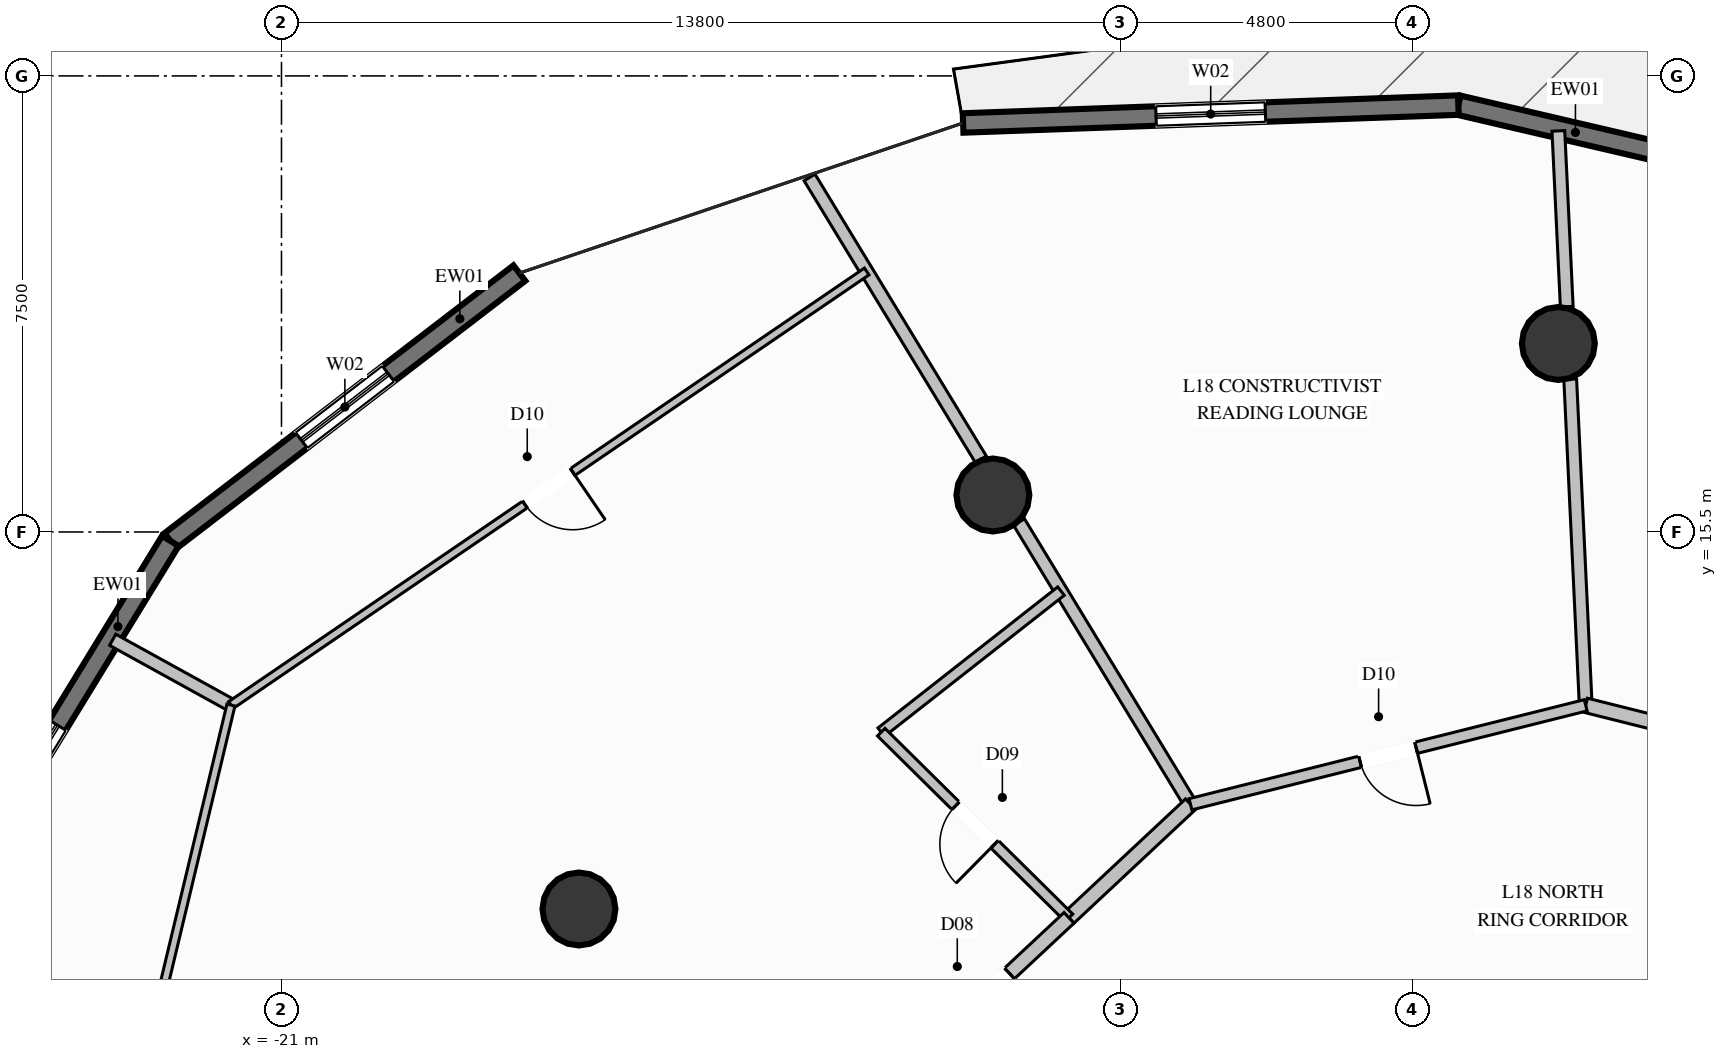
"""IFC4 building model, lengths in metres.
Left out: names, types, materials, properties, quantities, classifications, styles, units other than length and angle.
Written with IfcOpenShell. Run it as: python <this file> out.ifc"""

import sys

from ifc_helpers import new_model, si_unit, direction, frame, frame_2d, origin, origin_2d, place, context, subcontext, project, spatial, rectangle, circle, extrude, element, fill, save


model = new_model("IFC4")
c1 = context("Model", 3, precision=1e-05, world=origin(), true_north=direction((0.0, 1.0)))
c2 = subcontext(c1, "Body", "Model", "MODEL_VIEW")
j1 = project(units=[si_unit("LENGTHUNIT", "METRE"), si_unit("PLANEANGLEUNIT", "RADIAN")], contexts=[c1])
p1 = place(None, origin())
s1 = spatial("IfcSite", under=j1, at=p1, CompositionType="ELEMENT")
p2 = place(p1, origin())
s2 = spatial("IfcBuilding", under=s1, at=p2, CompositionType="ELEMENT")
p3 = place(p2, frame((0.0, 0.0, 75.2)))
s3 = spatial("IfcBuildingStorey", under=s2, at=p3, CompositionType="ELEMENT", Elevation=75.2)
for number, where, z_axis, x_axis in (
    (1, (0.0, 18.6, 0.0), (0.0, 0.0, 1.0), (1.0, 0.0, 0.0)),
    (2, (-9.3, 16.108, 0.0), (0.0, 0.0, 1.0), (1.0, 0.0, 0.0)),
    (3, (-16.108, 9.3, 0.0), (0.0, 0.0, 1.0), (1.0, 0.0, 0.0)),
):
    element("IfcColumn", number, at=place(p3, frame(where, z_axis=z_axis, x_axis=x_axis)), inside=s3, PredefinedType="COLUMN", context=c2, shape_type="SweptSolid", body=[
        extrude(circle(Radius=0.6, at=origin_2d()), origin(), (0.0, 0.0, 1.0), 3.6),
    ])
p4 = place(p3, frame((-1.645, 22.52, 0.0), z_axis=(0.0, 0.0, 1.0), x_axis=(0.973850842265, -0.227188329407, 0.0)))
e4 = element("IfcWall", 4, at=p4, inside=s3, PredefinedType="SOLIDWALL", context=c2, shape_type="SweptSolid", body=[
    extrude(rectangle(XDim=8.412, YDim=0.32, at=frame_2d((4.206, 0.0))), origin(), (0.0, 0.0, 1.0), 3.34),
])
p5 = place(p4, frame((4.205, 0.0, 0.35)))
e5 = element("IfcOpeningElement", 5, at=p5, cuts=e4, PredefinedType="OPENING", context=c2, shape_type="SweptSolid", body=[
    extrude(rectangle(XDim=1.8, YDim=2.6, at=frame_2d((0.9, 1.3))), frame((0.0, 0.17, 0.0), z_axis=(0.0, -1.0, 0.0), x_axis=(1.0, 0.0, 0.0)), (0.0, 0.0, 1.0), 0.34),
])
p6 = place(p3, frame((-9.79, 22.226, 0.0), z_axis=(0.0, 0.0, 1.0), x_axis=(0.999349428773, 0.03606548505, 0.0)))
e6 = element("IfcWall", 6, at=p6, inside=s3, PredefinedType="SOLIDWALL", context=c2, shape_type="SweptSolid", body=[
    extrude(rectangle(XDim=8.15, YDim=0.32, at=frame_2d((4.075, 0.0))), origin(), (0.0, 0.0, 1.0), 3.34),
])
p7 = place(p6, frame((3.175, 0.0, 0.35)))
e7 = element("IfcOpeningElement", 7, at=p7, cuts=e6, PredefinedType="OPENING", context=c2, shape_type="SweptSolid", body=[
    extrude(rectangle(XDim=1.8, YDim=2.6, at=frame_2d((0.9, 1.3))), frame((0.0, 0.17, 0.0), z_axis=(0.0, -1.0, 0.0), x_axis=(1.0, 0.0, 0.0)), (0.0, 0.0, 1.0), 0.34),
])
p8 = place(p3, frame((-22.827, 15.353, 0.0), z_axis=(0.0, 0.0, 1.0), x_axis=(0.793329795388, 0.608792112095, 0.0)))
e8 = element("IfcWall", 8, at=p8, inside=s3, PredefinedType="SOLIDWALL", context=c2, shape_type="SweptSolid", body=[
    extrude(rectangle(XDim=7.234, YDim=0.32, at=frame_2d((3.617, 0.0))), origin(), (0.0, 0.0, 1.0), 3.34),
])
p9 = place(p8, frame((2.717, 0.0, 0.35)))
e9 = element("IfcOpeningElement", 9, at=p9, cuts=e8, PredefinedType="OPENING", context=c2, shape_type="SweptSolid", body=[
    extrude(rectangle(XDim=1.8, YDim=2.6, at=frame_2d((0.9, 1.3))), frame((0.0, 0.17, 0.0), z_axis=(0.0, -1.0, 0.0), x_axis=(1.0, 0.0, 0.0)), (0.0, 0.0, 1.0), 0.34),
])
p10 = place(p3, frame((-26.443, 9.447, 0.0), z_axis=(0.0, 0.0, 1.0), x_axis=(0.522184211397, 0.852832720625, 0.0)))
e10 = element("IfcWall", 10, at=p10, inside=s3, PredefinedType="SOLIDWALL", context=c2, shape_type="SweptSolid", body=[
    extrude(rectangle(XDim=6.925, YDim=0.32, at=frame_2d((3.462, 0.0))), origin(), (0.0, 0.0, 1.0), 3.34),
])
p11 = place(p10, frame((1.571, 0.0, 0.35)))
e11 = element("IfcOpeningElement", 11, at=p11, cuts=e10, PredefinedType="OPENING", context=c2, shape_type="SweptSolid", body=[
    extrude(rectangle(XDim=1.8, YDim=2.6, at=frame_2d((0.9, 1.3))), frame((0.0, 0.17, 0.0), z_axis=(0.0, -1.0, 0.0), x_axis=(1.0, 0.0, 0.0)), (0.0, 0.0, 1.0), 0.34),
])
p12 = place(p3, frame((0.45, 12.65, 0.0), z_axis=(0.0, 0.0, 1.0), x_axis=(-0.047489507413, 0.998871736854, 0.0)))
e12 = element("IfcWall", 12, at=p12, inside=s3, PredefinedType="PARTITIONING", context=c2, shape_type="SweptSolid", body=[
    extrude(rectangle(XDim=5.367, YDim=0.21, at=frame_2d((2.684, 0.0))), origin(), (0.0, 0.0, 1.0), 2.709),
])
p13 = place(p3, frame((0.138, 19.205, 0.0), z_axis=(0.0, 0.0, 1.0), x_axis=(-0.047661338337, 0.998863552658, 0.0)))
e13 = element("IfcWall", 13, at=p13, inside=s3, PredefinedType="PARTITIONING", context=c2, shape_type="SweptSolid", body=[
    extrude(rectangle(XDim=2.894, YDim=0.21, at=frame_2d((1.447, 0.0))), origin(), (0.0, 0.0, 1.0), 3.34),
])
p14 = place(p3, frame((-6.05, 11.022, 0.0), z_axis=(0.0, 0.0, 1.0), x_axis=(-0.519360576882, 0.85455520078, 0.0)))
e14 = element("IfcWall", 14, at=p14, inside=s3, PredefinedType="PARTITIONING", context=c2, shape_type="SweptSolid", body=[
    extrude(rectangle(XDim=5.43, YDim=0.21, at=frame_2d((2.715, 0.0))), origin(), (0.0, 0.0, 1.0), 2.709),
])
p15 = place(p3, frame((-9.498, 16.695, 0.0), z_axis=(0.0, 0.0, 1.0), x_axis=(-0.519352781988, 0.854559938121, 0.0)))
e15 = element("IfcWall", 15, at=p15, inside=s3, PredefinedType="PARTITIONING", context=c2, shape_type="SweptSolid", body=[
    extrude(rectangle(XDim=5.424, YDim=0.21, at=frame_2d((2.712, 0.0))), origin(), (0.0, 0.0, 1.0), 3.34),
])
p16 = place(p3, frame((-6.05, 11.022, 0.0), z_axis=(0.0, 0.0, 1.0), x_axis=(-0.730494026404, -0.682919085535, 0.0)))
e16 = element("IfcWall", 16, at=p16, inside=s3, PredefinedType="PARTITIONING", context=c2, shape_type="SweptSolid", body=[
    extrude(rectangle(XDim=2.735, YDim=0.24, at=frame_2d((1.368, 0.0))), origin(), (0.0, 0.0, 1.0), 3.34),
])
p17 = place(p3, frame((-8.18, 14.527, 0.0), z_axis=(0.0, 0.0, 1.0), x_axis=(-0.786773597638, -0.617241691771, 0.0)))
e17 = element("IfcWall", 17, at=p17, inside=s3, PredefinedType="PLUMBINGWALL", context=c2, shape_type="SweptSolid", body=[
    extrude(rectangle(XDim=3.757, YDim=0.175, at=frame_2d((1.878, 0.0))), origin(), (0.0, 0.0, 1.0), 3.34),
])
p18 = place(p3, frame((-8.048, 9.154, 0.0), z_axis=(0.0, 0.0, 1.0), x_axis=(-0.711002906065, 0.703189069573, 0.0)))
e18 = element("IfcWall", 18, at=p18, inside=s3, PredefinedType="PLUMBINGWALL", context=c2, shape_type="SweptSolid", body=[
    extrude(rectangle(XDim=4.343, YDim=0.175, at=frame_2d((2.171, 0.0))), origin(), (0.0, 0.0, 1.0), 3.34),
])
p19 = place(p18, frame((1.722, 0.0, 0.0)))
e19 = element("IfcOpeningElement", 19, at=p19, cuts=e18, PredefinedType="OPENING", context=c2, shape_type="SweptSolid", body=[
    extrude(rectangle(XDim=0.9, YDim=2.1, at=frame_2d((0.45, 1.05))), frame((0.0, 0.098, 0.0), z_axis=(0.0, -1.0, 0.0), x_axis=(1.0, 0.0, 0.0)), (0.0, 0.0, 1.0), 0.195),
])
p20 = place(p3, frame((-21.831, 12.654, 0.0), z_axis=(0.0, 0.0, 1.0), x_axis=(-0.875579287151, 0.483074437237, 0.0)))
e20 = element("IfcWall", 20, at=p20, inside=s3, PredefinedType="PARTITIONING", context=c2, shape_type="SweptSolid", body=[
    extrude(rectangle(XDim=2.221, YDim=0.21, at=frame_2d((1.111, 0.0))), origin(), (0.0, 0.0, 1.0), 3.34),
])
p21 = place(p3, frame((-8.048, 9.154, 0.0), z_axis=(0.0, 0.0, 1.0), x_axis=(-0.73064678366, -0.682755649941, 0.0)))
e21 = element("IfcWall", 21, at=p21, inside=s3, PredefinedType="PARTITIONING", context=c2, shape_type="SweptSolid", body=[
    extrude(rectangle(XDim=3.778, YDim=0.24, at=frame_2d((1.889, 0.0))), origin(), (0.0, 0.0, 1.0), 3.34),
])
p22 = place(p21, frame((1.339, 0.0, 0.0)))
e22 = element("IfcOpeningElement", 22, at=p22, cuts=e21, PredefinedType="OPENING", context=c2, shape_type="SweptSolid", body=[
    extrude(rectangle(XDim=1.1, YDim=2.3, at=frame_2d((0.55, 1.15))), frame((0.0, 0.13, 0.0), z_axis=(0.0, -1.0, 0.0), x_axis=(1.0, 0.0, 0.0)), (0.0, 0.0, 1.0), 0.26),
])
p23 = place(p3, frame((-11.375, 19.784, 0.0), z_axis=(0.0, 0.0, 1.0), x_axis=(-0.826199588729, -0.563377528469, 0.0)))
e23 = element("IfcWall", 23, at=p23, inside=s3, PredefinedType="PARTITIONING", context=c2, shape_type="SweptSolid", body=[
    extrude(rectangle(XDim=12.656, YDim=0.135, at=frame_2d((6.328, 0.0))), origin(), (0.0, 0.0, 1.0), 3.34),
])
p24 = place(p23, frame((5.853, 0.0, 0.0)))
e24 = element("IfcOpeningElement", 24, at=p24, cuts=e23, PredefinedType="OPENING", context=c2, shape_type="SweptSolid", body=[
    extrude(rectangle(XDim=0.95, YDim=2.1, at=frame_2d((0.475, 1.05))), frame((0.0, 0.078, 0.0), z_axis=(0.0, -1.0, 0.0), x_axis=(1.0, 0.0, 0.0)), (0.0, 0.0, 1.0), 0.155),
])
p25 = place(p3, frame((-21.831, 12.654, 0.0), z_axis=(0.0, 0.0, 1.0), x_axis=(-0.232716823602, -0.972544538832, 0.0)))
e25 = element("IfcWall", 25, at=p25, inside=s3, PredefinedType="PARTITIONING", context=c2, shape_type="SweptSolid", body=[
    extrude(rectangle(XDim=12.934, YDim=0.135, at=frame_2d((6.467, 0.0))), origin(), (0.0, 0.0, 1.0), 3.34),
])
p26 = place(p25, frame((5.992, 0.0, 0.0)))
e26 = element("IfcOpeningElement", 26, at=p26, cuts=e25, PredefinedType="OPENING", context=c2, shape_type="SweptSolid", body=[
    extrude(rectangle(XDim=0.95, YDim=2.1, at=frame_2d((0.475, 1.05))), frame((0.0, 0.078, 0.0), z_axis=(0.0, -1.0, 0.0), x_axis=(1.0, 0.0, 0.0)), (0.0, 0.0, 1.0), 0.155),
])
p27 = place(p3, frame((4.22, 11.706, 0.0), z_axis=(0.0, 0.0, 1.0), x_axis=(-0.970061149619, 0.24286079552, 0.0)))
e27 = element("IfcWall", 27, at=p27, inside=s3, PredefinedType="PARTITIONING", context=c2, shape_type="SweptSolid", body=[
    extrude(rectangle(XDim=3.886, YDim=0.24, at=frame_2d((1.943, 0.0))), origin(), (0.0, 0.0, 1.0), 3.34),
])
p28 = place(p27, frame((1.443, 0.0, 0.0)))
e28 = element("IfcOpeningElement", 28, at=p28, cuts=e27, PredefinedType="OPENING", context=c2, shape_type="SweptSolid", body=[
    extrude(rectangle(XDim=1.0, YDim=2.2, at=frame_2d((0.5, 1.1))), frame((0.0, 0.13, 0.0), z_axis=(0.0, -1.0, 0.0), x_axis=(1.0, 0.0, 0.0)), (0.0, 0.0, 1.0), 0.26),
])
p29 = place(p3, frame((0.45, 12.65, 0.0), z_axis=(0.0, 0.0, 1.0), x_axis=(-0.970039538206, -0.242947101891, 0.0)))
e29 = element("IfcWall", 29, at=p29, inside=s3, PredefinedType="PARTITIONING", context=c2, shape_type="SweptSolid", body=[
    extrude(rectangle(XDim=6.701, YDim=0.19, at=frame_2d((3.35, 0.0))), origin(), (0.0, 0.0, 1.0), 3.34),
])
p30 = place(p29, frame((2.875, 0.0, 0.0)))
e30 = element("IfcOpeningElement", 30, at=p30, cuts=e29, PredefinedType="OPENING", context=c2, shape_type="SweptSolid", body=[
    extrude(rectangle(XDim=0.95, YDim=2.1, at=frame_2d((0.475, 1.05))), frame((0.0, 0.105, 0.0), z_axis=(0.0, -1.0, 0.0), x_axis=(1.0, 0.0, 0.0)), (0.0, 0.0, 1.0), 0.21),
])
p31 = place(p7, origin())
e31 = element("IfcWindow", 31, at=p31, inside=s3, PartitioningType="SINGLE_PANEL", PredefinedType="WINDOW", context=c2, shape_type="SweptSolid", body=[
    extrude(rectangle(XDim=1.8, YDim=2.6, at=frame_2d((0.9, 1.3))), frame((0.0, 0.03, 0.0), z_axis=(0.0, -1.0, 0.0), x_axis=(1.0, 0.0, 0.0)), (0.0, 0.0, 1.0), 0.06),
])
fill(e7, e31)
p32 = place(p9, origin())
e32 = element("IfcWindow", 32, at=p32, inside=s3, PartitioningType="SINGLE_PANEL", PredefinedType="WINDOW", context=c2, shape_type="SweptSolid", body=[
    extrude(rectangle(XDim=1.8, YDim=2.6, at=frame_2d((0.9, 1.3))), frame((0.0, 0.03, 0.0), z_axis=(0.0, -1.0, 0.0), x_axis=(1.0, 0.0, 0.0)), (0.0, 0.0, 1.0), 0.06),
])
fill(e9, e32)
p33 = place(p11, origin())
e33 = element("IfcWindow", 33, at=p33, inside=s3, PartitioningType="SINGLE_PANEL", PredefinedType="WINDOW", context=c2, shape_type="SweptSolid", body=[
    extrude(rectangle(XDim=1.8, YDim=2.6, at=frame_2d((0.9, 1.3))), frame((0.0, 0.03, 0.0), z_axis=(0.0, -1.0, 0.0), x_axis=(1.0, 0.0, 0.0)), (0.0, 0.0, 1.0), 0.06),
])
fill(e11, e33)
p34 = place(p19, origin())
e34 = element("IfcDoor", 34, at=p34, inside=s3, OperationType="SINGLE_SWING_LEFT", PredefinedType="DOOR", context=c2, shape_type="SweptSolid", body=[
    extrude(rectangle(XDim=0.9, YDim=2.1, at=frame_2d((0.45, 1.05))), frame((0.0, 0.025, 0.0), z_axis=(0.0, -1.0, 0.0), x_axis=(1.0, 0.0, 0.0)), (0.0, 0.0, 1.0), 0.05),
])
fill(e19, e34)
p35 = place(p22, origin())
e35 = element("IfcDoor", 35, at=p35, inside=s3, OperationType="SINGLE_SWING_RIGHT", PredefinedType="DOOR", context=c2, shape_type="SweptSolid", body=[
    extrude(rectangle(XDim=1.1, YDim=2.3, at=frame_2d((0.55, 1.15))), frame((0.0, 0.025, 0.0), z_axis=(0.0, -1.0, 0.0), x_axis=(1.0, 0.0, 0.0)), (0.0, 0.0, 1.0), 0.05),
])
fill(e22, e35)
p36 = place(p24, origin())
e36 = element("IfcDoor", 36, at=p36, inside=s3, OperationType="SINGLE_SWING_LEFT", PredefinedType="DOOR", context=c2, shape_type="SweptSolid", body=[
    extrude(rectangle(XDim=0.95, YDim=2.1, at=frame_2d((0.475, 1.05))), frame((0.0, 0.025, 0.0), z_axis=(0.0, -1.0, 0.0), x_axis=(1.0, 0.0, 0.0)), (0.0, 0.0, 1.0), 0.05),
])
fill(e24, e36)
p37 = place(p30, origin())
e37 = element("IfcDoor", 37, at=p37, inside=s3, OperationType="SINGLE_SWING_LEFT", PredefinedType="DOOR", context=c2, shape_type="SweptSolid", body=[
    extrude(rectangle(XDim=0.95, YDim=2.1, at=frame_2d((0.475, 1.05))), frame((0.0, 0.025, 0.0), z_axis=(0.0, -1.0, 0.0), x_axis=(1.0, 0.0, 0.0)), (0.0, 0.0, 1.0), 0.05),
])
fill(e30, e37)
save(model, sys.argv[1])
